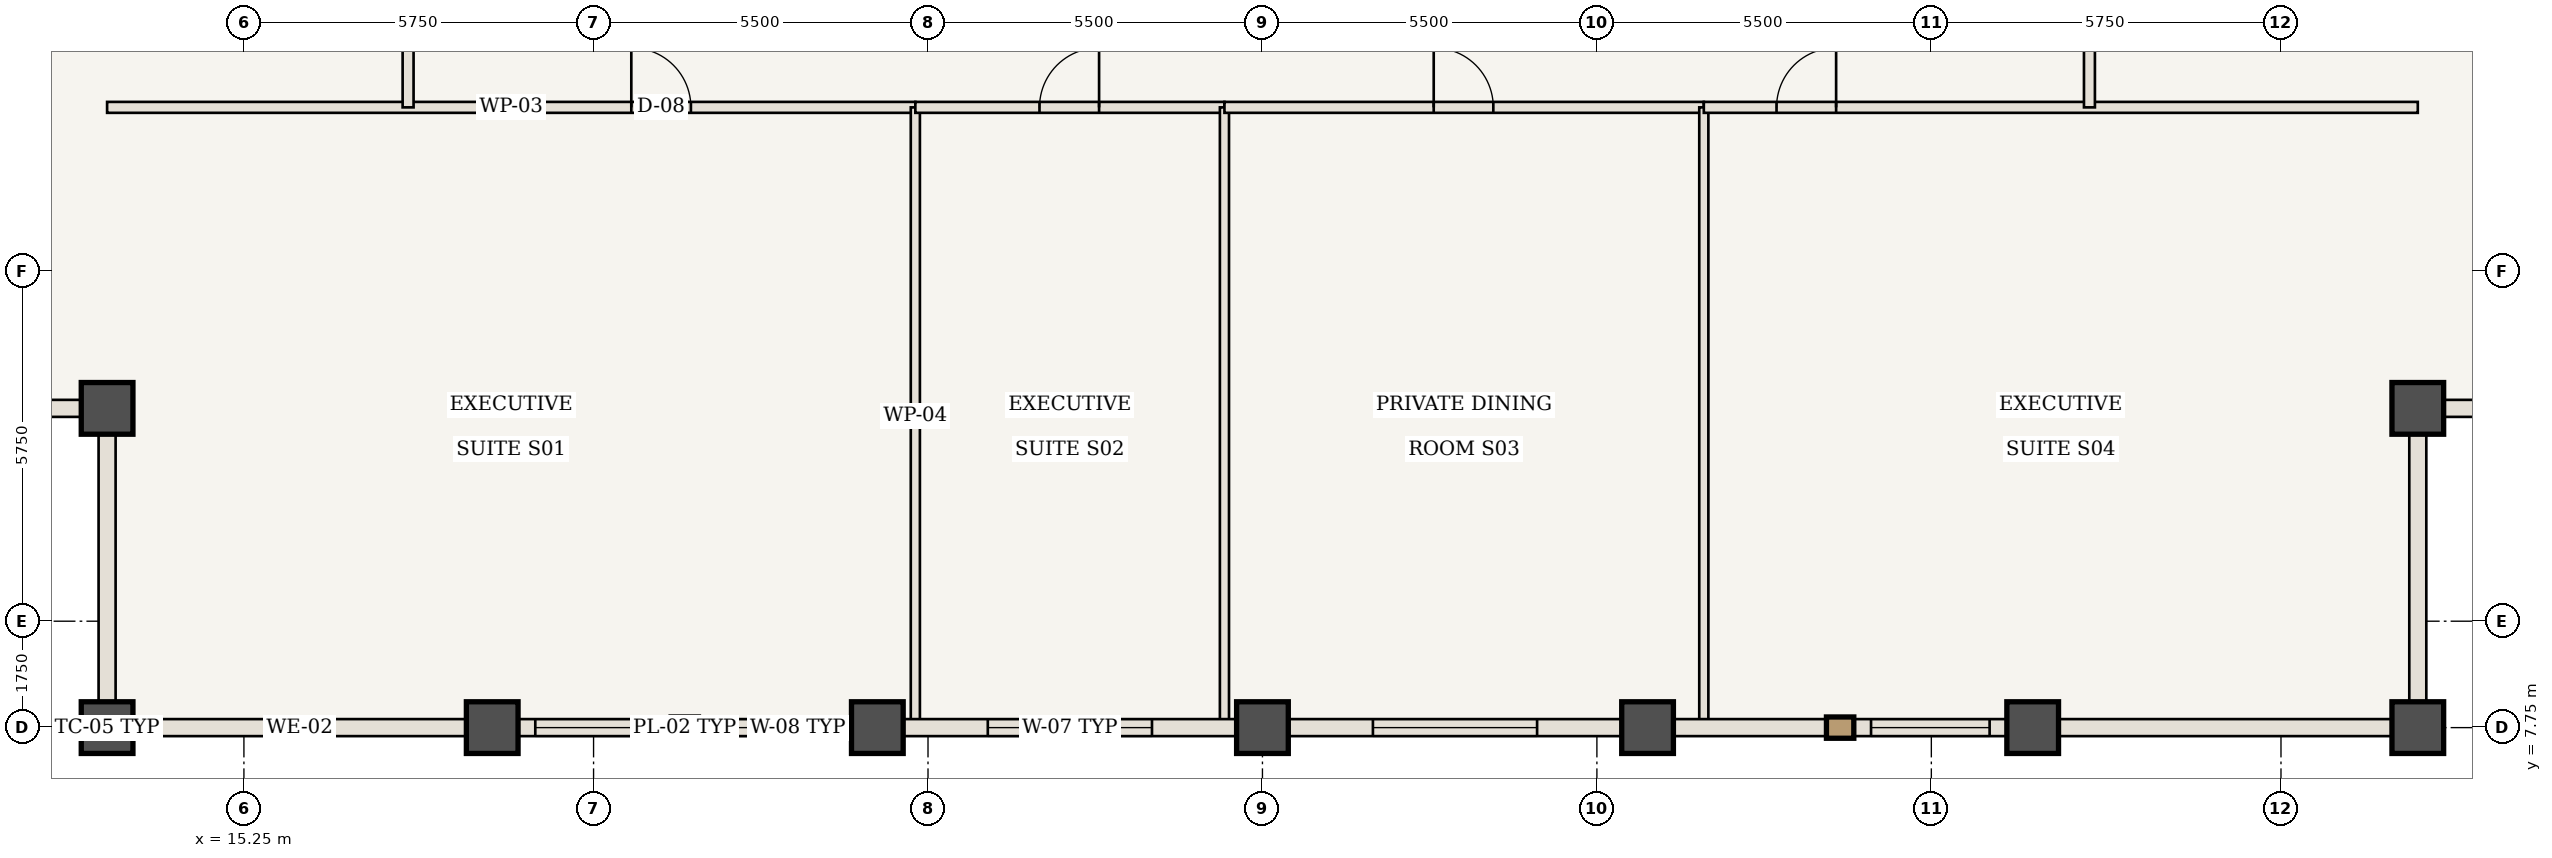
"""IFC4 building model, lengths in metres.
Left out: names, types, materials, properties, quantities, classifications, styles, units other than length and angle.
Written with IfcOpenShell. Run it as: python <this file> out.ifc"""

import sys

from ifc_helpers import new_model, si_unit, direction, frame, frame_2d, origin, origin_2d, place, context, subcontext, project, spatial, rectangle, extrude, element, fill, save


model = new_model("IFC4")
c1 = context("Model", 3, precision=1e-05, world=origin(), true_north=direction((0.0, 1.0)))
c2 = subcontext(c1, "Body", "Model", "MODEL_VIEW")
j1 = project(units=[si_unit("LENGTHUNIT", "METRE"), si_unit("PLANEANGLEUNIT", "RADIAN")], contexts=[c1])
p1 = place(None, origin())
s1 = spatial("IfcSite", under=j1, at=p1, CompositionType="ELEMENT")
p2 = place(p1, origin())
s2 = spatial("IfcBuilding", under=s1, at=p2, CompositionType="ELEMENT")
p3 = place(p2, frame((0.0, 0.0, 229.25)))
s3 = spatial("IfcBuildingStorey", under=s2, at=p3, CompositionType="ELEMENT", Elevation=229.25)
for number, where, z_axis, x_axis in (
    (1, (13.0, 7.75, 0.0), (0.0, 0.0, 1.0), (1.0, 0.0, 0.0)),
    (2, (13.0, 13.0, 0.0), (0.0, 0.0, 1.0), (1.0, 0.0, 0.0)),
    (3, (51.0, 7.75, 0.0), (0.0, 0.0, 1.0), (1.0, 0.0, 0.0)),
    (4, (51.0, 13.0, 0.0), (0.0, 0.0, 1.0), (1.0, 0.0, 0.0)),
    (5, (19.333, 7.75, 0.0), (0.0, 0.0, 1.0), (1.0, 0.0, 0.0)),
    (6, (25.667, 7.75, 0.0), (0.0, 0.0, 1.0), (1.0, 0.0, 0.0)),
    (7, (32.0, 7.75, 0.0), (0.0, 0.0, 1.0), (1.0, 0.0, 0.0)),
    (8, (38.333, 7.75, 0.0), (0.0, 0.0, 1.0), (1.0, 0.0, 0.0)),
    (9, (44.667, 7.75, 0.0), (0.0, 0.0, 1.0), (1.0, 0.0, 0.0)),
):
    element("IfcColumn", number, at=place(p3, frame(where, z_axis=z_axis, x_axis=x_axis)), inside=s3, PredefinedType="COLUMN", context=c2, shape_type="SweptSolid", body=[
        extrude(rectangle(XDim=0.85, YDim=0.85, at=origin_2d()), origin(), (0.0, 0.0, 1.0), 3.85),
    ])
p4 = place(p3, frame((13.0, 17.95, 0.0), z_axis=(0.0, 0.0, 1.0), x_axis=(1.0, 0.0, 0.0)))
e10 = element("IfcWall", 10, at=p4, inside=s3, PredefinedType="STANDARD", context=c2, shape_type="SweptSolid", body=[
    extrude(rectangle(XDim=13.292, YDim=0.18, at=frame_2d((6.646, 0.0))), origin(), (0.0, 0.0, 1.0), 3.685),
])
p5 = place(p4, frame((8.621, 0.0, 0.0)))
e11 = element("IfcOpeningElement", 11, at=p5, cuts=e10, PredefinedType="OPENING", context=c2, shape_type="SweptSolid", body=[
    extrude(rectangle(XDim=0.98, YDim=2.2, at=frame_2d((0.49, 1.1))), frame((0.0, 0.1, 0.0), z_axis=(0.0, -1.0, 0.0), x_axis=(1.0, 0.0, 0.0)), (0.0, 0.0, 1.0), 0.2),
])
p6 = place(p3, frame((26.292, 7.81, 0.0), z_axis=(0.0, 0.0, 1.0), x_axis=(0.0, 1.0, 0.0)))
e12 = element("IfcWall", 12, at=p6, inside=s3, PredefinedType="STANDARD", context=c2, shape_type="SweptSolid", body=[
    extrude(rectangle(XDim=10.14, YDim=0.15, at=frame_2d((5.07, 0.0))), origin(), (0.0, 0.0, 1.0), 3.685),
])
p7 = place(p3, frame((26.292, 17.95, 0.0), z_axis=(0.0, 0.0, 1.0), x_axis=(1.0, 0.0, 0.0)))
e13 = element("IfcWall", 13, at=p7, inside=s3, PredefinedType="STANDARD", context=c2, shape_type="SweptSolid", body=[
    extrude(rectangle(XDim=5.083, YDim=0.18, at=frame_2d((2.542, 0.0))), origin(), (0.0, 0.0, 1.0), 3.685),
])
p8 = place(p7, frame((2.042, 0.0, 0.0)))
e14 = element("IfcOpeningElement", 14, at=p8, cuts=e13, PredefinedType="OPENING", context=c2, shape_type="SweptSolid", body=[
    extrude(rectangle(XDim=0.98, YDim=2.2, at=frame_2d((0.49, 1.1))), frame((0.0, 0.1, 0.0), z_axis=(0.0, -1.0, 0.0), x_axis=(1.0, 0.0, 0.0)), (0.0, 0.0, 1.0), 0.2),
])
p9 = place(p3, frame((31.375, 7.81, 0.0), z_axis=(0.0, 0.0, 1.0), x_axis=(0.0, 1.0, 0.0)))
e15 = element("IfcWall", 15, at=p9, inside=s3, PredefinedType="STANDARD", context=c2, shape_type="SweptSolid", body=[
    extrude(rectangle(XDim=10.14, YDim=0.15, at=frame_2d((5.07, 0.0))), origin(), (0.0, 0.0, 1.0), 3.685),
])
p10 = place(p3, frame((31.375, 17.95, 0.0), z_axis=(0.0, 0.0, 1.0), x_axis=(1.0, 0.0, 0.0)))
e16 = element("IfcWall", 16, at=p10, inside=s3, PredefinedType="STANDARD", context=c2, shape_type="SweptSolid", body=[
    extrude(rectangle(XDim=7.883, YDim=0.18, at=frame_2d((3.942, 0.0))), origin(), (0.0, 0.0, 1.0), 3.685),
])
p11 = place(p10, frame((3.442, 0.0, 0.0)))
e17 = element("IfcOpeningElement", 17, at=p11, cuts=e16, PredefinedType="OPENING", context=c2, shape_type="SweptSolid", body=[
    extrude(rectangle(XDim=0.98, YDim=2.2, at=frame_2d((0.49, 1.1))), frame((0.0, 0.1, 0.0), z_axis=(0.0, -1.0, 0.0), x_axis=(1.0, 0.0, 0.0)), (0.0, 0.0, 1.0), 0.2),
])
p12 = place(p3, frame((39.258, 7.81, 0.0), z_axis=(0.0, 0.0, 1.0), x_axis=(0.0, 1.0, 0.0)))
e18 = element("IfcWall", 18, at=p12, inside=s3, PredefinedType="STANDARD", context=c2, shape_type="SweptSolid", body=[
    extrude(rectangle(XDim=10.14, YDim=0.15, at=frame_2d((5.07, 0.0))), origin(), (0.0, 0.0, 1.0), 3.685),
])
p13 = place(p3, frame((39.258, 17.95, 0.0), z_axis=(0.0, 0.0, 1.0), x_axis=(1.0, 0.0, 0.0)))
e19 = element("IfcWall", 19, at=p13, inside=s3, PredefinedType="STANDARD", context=c2, shape_type="SweptSolid", body=[
    extrude(rectangle(XDim=11.742, YDim=0.18, at=frame_2d((5.871, 0.0))), origin(), (0.0, 0.0, 1.0), 3.685),
])
p14 = place(p13, frame((1.196, 0.0, 0.0)))
e20 = element("IfcOpeningElement", 20, at=p14, cuts=e19, PredefinedType="OPENING", context=c2, shape_type="SweptSolid", body=[
    extrude(rectangle(XDim=0.98, YDim=2.2, at=frame_2d((0.49, 1.1))), frame((0.0, 0.1, 0.0), z_axis=(0.0, -1.0, 0.0), x_axis=(1.0, 0.0, 0.0)), (0.0, 0.0, 1.0), 0.2),
])
p15 = place(p3, frame((17.95, 17.95, 0.0), z_axis=(0.0, 0.0, 1.0), x_axis=(0.0, 1.0, 0.0)))
e21 = element("IfcWall", 21, at=p15, inside=s3, PredefinedType="STANDARD", context=c2, shape_type="SweptSolid", body=[
    extrude(rectangle(XDim=6.642, YDim=0.18, at=frame_2d((3.321, 0.0))), origin(), (0.0, 0.0, 1.0), 3.685),
])
p16 = place(p15, frame((4.271, 0.0, 0.0)))
e22 = element("IfcOpeningElement", 22, at=p16, cuts=e21, PredefinedType="OPENING", context=c2, shape_type="SweptSolid", body=[
    extrude(rectangle(XDim=0.98, YDim=2.2, at=frame_2d((0.49, 1.1))), frame((0.0, 0.1, 0.0), z_axis=(0.0, -1.0, 0.0), x_axis=(1.0, 0.0, 0.0)), (0.0, 0.0, 1.0), 0.2),
])
p17 = place(p3, frame((45.6, 17.95, 0.0), z_axis=(0.0, 0.0, 1.0), x_axis=(0.0, 1.0, 0.0)))
e23 = element("IfcWall", 23, at=p17, inside=s3, PredefinedType="STANDARD", context=c2, shape_type="SweptSolid", body=[
    extrude(rectangle(XDim=13.1, YDim=0.18, at=frame_2d((6.55, 0.0))), origin(), (0.0, 0.0, 1.0), 3.685),
])
p18 = place(p17, frame((6.05, 0.0, 0.0)))
e24 = element("IfcOpeningElement", 24, at=p18, cuts=e23, PredefinedType="OPENING", context=c2, shape_type="SweptSolid", body=[
    extrude(rectangle(XDim=0.98, YDim=2.2, at=frame_2d((0.49, 1.1))), frame((0.0, 0.1, 0.0), z_axis=(0.0, -1.0, 0.0), x_axis=(1.0, 0.0, 0.0)), (0.0, 0.0, 1.0), 0.2),
])
p19 = place(p3, frame((19.333, 7.75, 0.0), z_axis=(0.0, 0.0, 1.0), x_axis=(-1.0, 0.0, 0.0)))
e25 = element("IfcWall", 25, at=p19, inside=s3, PredefinedType="USERDEFINED", context=c2, shape_type="SweptSolid", body=[
    extrude(rectangle(XDim=6.333, YDim=0.28, at=frame_2d((3.167, 0.0))), origin(), (0.0, 0.0, 1.0), 2.985),
])
p20 = place(p3, frame((25.667, 7.75, 0.0), z_axis=(0.0, 0.0, 1.0), x_axis=(-1.0, 0.0, 0.0)))
e26 = element("IfcWall", 26, at=p20, inside=s3, PredefinedType="USERDEFINED", context=c2, shape_type="SweptSolid", body=[
    extrude(rectangle(XDim=6.333, YDim=0.28, at=frame_2d((3.167, 0.0))), origin(), (0.0, 0.0, 1.0), 2.985),
])
p21 = place(p20, frame((0.708, 0.0, 0.85)))
e27 = element("IfcOpeningElement", 27, at=p21, cuts=e26, PredefinedType="OPENING", context=c2, shape_type="SweptSolid", body=[
    extrude(rectangle(XDim=1.95, YDim=1.935, at=frame_2d((0.975, 0.968))), frame((0.0, 0.15, 0.0), z_axis=(0.0, -1.0, 0.0), x_axis=(1.0, 0.0, 0.0)), (0.0, 0.0, 1.0), 0.3),
])
p22 = place(p20, frame((3.675, 0.0, 0.85)))
e28 = element("IfcOpeningElement", 28, at=p22, cuts=e26, PredefinedType="OPENING", context=c2, shape_type="SweptSolid", body=[
    extrude(rectangle(XDim=1.95, YDim=1.935, at=frame_2d((0.975, 0.968))), frame((0.0, 0.15, 0.0), z_axis=(0.0, -1.0, 0.0), x_axis=(1.0, 0.0, 0.0)), (0.0, 0.0, 1.0), 0.3),
])
p23 = place(p3, frame((32.0, 7.75, 0.0), z_axis=(0.0, 0.0, 1.0), x_axis=(-1.0, 0.0, 0.0)))
e29 = element("IfcWall", 29, at=p23, inside=s3, PredefinedType="USERDEFINED", context=c2, shape_type="SweptSolid", body=[
    extrude(rectangle(XDim=6.333, YDim=0.28, at=frame_2d((3.167, 0.0))), origin(), (0.0, 0.0, 1.0), 2.985),
])
p24 = place(p23, frame((1.817, 0.0, 0.85)))
e30 = element("IfcOpeningElement", 30, at=p24, cuts=e29, PredefinedType="OPENING", context=c2, shape_type="SweptSolid", body=[
    extrude(rectangle(XDim=2.7, YDim=1.935, at=frame_2d((1.35, 0.968))), frame((0.0, 0.15, 0.0), z_axis=(0.0, -1.0, 0.0), x_axis=(1.0, 0.0, 0.0)), (0.0, 0.0, 1.0), 0.3),
])
p25 = place(p3, frame((38.333, 7.75, 0.0), z_axis=(0.0, 0.0, 1.0), x_axis=(-1.0, 0.0, 0.0)))
e31 = element("IfcWall", 31, at=p25, inside=s3, PredefinedType="USERDEFINED", context=c2, shape_type="SweptSolid", body=[
    extrude(rectangle(XDim=6.333, YDim=0.28, at=frame_2d((3.167, 0.0))), origin(), (0.0, 0.0, 1.0), 2.985),
])
p26 = place(p25, frame((1.817, 0.0, 0.85)))
e32 = element("IfcOpeningElement", 32, at=p26, cuts=e31, PredefinedType="OPENING", context=c2, shape_type="SweptSolid", body=[
    extrude(rectangle(XDim=2.7, YDim=1.935, at=frame_2d((1.35, 0.968))), frame((0.0, 0.15, 0.0), z_axis=(0.0, -1.0, 0.0), x_axis=(1.0, 0.0, 0.0)), (0.0, 0.0, 1.0), 0.3),
])
p27 = place(p3, frame((44.667, 7.75, 0.0), z_axis=(0.0, 0.0, 1.0), x_axis=(-1.0, 0.0, 0.0)))
e33 = element("IfcWall", 33, at=p27, inside=s3, PredefinedType="USERDEFINED", context=c2, shape_type="SweptSolid", body=[
    extrude(rectangle(XDim=6.333, YDim=0.28, at=frame_2d((3.167, 0.0))), origin(), (0.0, 0.0, 1.0), 2.985),
])
p28 = place(p27, frame((0.708, 0.0, 0.85)))
e34 = element("IfcOpeningElement", 34, at=p28, cuts=e33, PredefinedType="OPENING", context=c2, shape_type="SweptSolid", body=[
    extrude(rectangle(XDim=1.95, YDim=1.935, at=frame_2d((0.975, 0.968))), frame((0.0, 0.15, 0.0), z_axis=(0.0, -1.0, 0.0), x_axis=(1.0, 0.0, 0.0)), (0.0, 0.0, 1.0), 0.3),
])
p29 = place(p3, frame((51.0, 7.75, 0.0), z_axis=(0.0, 0.0, 1.0), x_axis=(-1.0, 0.0, 0.0)))
e35 = element("IfcWall", 35, at=p29, inside=s3, PredefinedType="USERDEFINED", context=c2, shape_type="SweptSolid", body=[
    extrude(rectangle(XDim=6.333, YDim=0.28, at=frame_2d((3.167, 0.0))), origin(), (0.0, 0.0, 1.0), 2.985),
])
for number, where, z_axis, x_axis in (
    (36, (13.0, 7.75, 0.0), (0.0, 0.0, 1.0), (0.0, 1.0, 0.0)),
    (37, (13.0, 13.0, 0.0), (0.0, 0.0, 1.0), (-1.0, 0.0, 0.0)),
    (38, (51.0, 13.0, 0.0), (0.0, 0.0, 1.0), (0.0, -1.0, 0.0)),
    (39, (56.25, 13.0, 0.0), (0.0, 0.0, 1.0), (-1.0, 0.0, 0.0)),
):
    element("IfcWall", number, at=place(p3, frame(where, z_axis=z_axis, x_axis=x_axis)), inside=s3, PredefinedType="USERDEFINED", context=c2, shape_type="SweptSolid", body=[
        extrude(rectangle(XDim=5.25, YDim=0.28, at=frame_2d((2.625, 0.0))), origin(), (0.0, 0.0, 1.0), 2.985),
    ])
p30 = place(p5, origin())
e40 = element("IfcDoor", 40, at=p30, inside=s3, OperationType="SINGLE_SWING_LEFT", PredefinedType="DOOR", context=c2, shape_type="SweptSolid", body=[
    extrude(rectangle(XDim=0.98, YDim=2.2, at=frame_2d((0.49, 1.1))), frame((0.0, 0.025, 0.0), z_axis=(0.0, -1.0, 0.0), x_axis=(1.0, 0.0, 0.0)), (0.0, 0.0, 1.0), 0.05),
])
fill(e11, e40)
p31 = place(p8, origin())
e41 = element("IfcDoor", 41, at=p31, inside=s3, OperationType="SINGLE_SWING_RIGHT", PredefinedType="DOOR", context=c2, shape_type="SweptSolid", body=[
    extrude(rectangle(XDim=0.98, YDim=2.2, at=frame_2d((0.49, 1.1))), frame((0.0, 0.025, 0.0), z_axis=(0.0, -1.0, 0.0), x_axis=(1.0, 0.0, 0.0)), (0.0, 0.0, 1.0), 0.05),
])
fill(e14, e41)
p32 = place(p11, origin())
e42 = element("IfcDoor", 42, at=p32, inside=s3, OperationType="SINGLE_SWING_LEFT", PredefinedType="DOOR", context=c2, shape_type="SweptSolid", body=[
    extrude(rectangle(XDim=0.98, YDim=2.2, at=frame_2d((0.49, 1.1))), frame((0.0, 0.025, 0.0), z_axis=(0.0, -1.0, 0.0), x_axis=(1.0, 0.0, 0.0)), (0.0, 0.0, 1.0), 0.05),
])
fill(e17, e42)
p33 = place(p14, origin())
e43 = element("IfcDoor", 43, at=p33, inside=s3, OperationType="SINGLE_SWING_RIGHT", PredefinedType="DOOR", context=c2, shape_type="SweptSolid", body=[
    extrude(rectangle(XDim=0.98, YDim=2.2, at=frame_2d((0.49, 1.1))), frame((0.0, 0.025, 0.0), z_axis=(0.0, -1.0, 0.0), x_axis=(1.0, 0.0, 0.0)), (0.0, 0.0, 1.0), 0.05),
])
fill(e20, e43)
p34 = place(p21, origin())
e44 = element("IfcWindow", 44, at=p34, inside=s3, PartitioningType="SINGLE_PANEL", PredefinedType="WINDOW", context=c2, shape_type="SweptSolid", body=[
    extrude(rectangle(XDim=1.95, YDim=1.935, at=frame_2d((0.975, 0.968))), frame((0.0, 0.03, 0.0), z_axis=(0.0, -1.0, 0.0), x_axis=(1.0, 0.0, 0.0)), (0.0, 0.0, 1.0), 0.06),
])
fill(e27, e44)
p35 = place(p22, origin())
e45 = element("IfcWindow", 45, at=p35, inside=s3, PartitioningType="SINGLE_PANEL", PredefinedType="WINDOW", context=c2, shape_type="SweptSolid", body=[
    extrude(rectangle(XDim=1.95, YDim=1.935, at=frame_2d((0.975, 0.968))), frame((0.0, 0.03, 0.0), z_axis=(0.0, -1.0, 0.0), x_axis=(1.0, 0.0, 0.0)), (0.0, 0.0, 1.0), 0.06),
])
fill(e28, e45)
p36 = place(p24, origin())
e46 = element("IfcWindow", 46, at=p36, inside=s3, PartitioningType="SINGLE_PANEL", PredefinedType="WINDOW", context=c2, shape_type="SweptSolid", body=[
    extrude(rectangle(XDim=2.7, YDim=1.935, at=frame_2d((1.35, 0.968))), frame((0.0, 0.03, 0.0), z_axis=(0.0, -1.0, 0.0), x_axis=(1.0, 0.0, 0.0)), (0.0, 0.0, 1.0), 0.06),
])
fill(e30, e46)
p37 = place(p26, origin())
e47 = element("IfcWindow", 47, at=p37, inside=s3, PartitioningType="SINGLE_PANEL", PredefinedType="WINDOW", context=c2, shape_type="SweptSolid", body=[
    extrude(rectangle(XDim=2.7, YDim=1.935, at=frame_2d((1.35, 0.968))), frame((0.0, 0.03, 0.0), z_axis=(0.0, -1.0, 0.0), x_axis=(1.0, 0.0, 0.0)), (0.0, 0.0, 1.0), 0.06),
])
fill(e32, e47)
p38 = place(p28, origin())
e48 = element("IfcWindow", 48, at=p38, inside=s3, PartitioningType="SINGLE_PANEL", PredefinedType="WINDOW", context=c2, shape_type="SweptSolid", body=[
    extrude(rectangle(XDim=1.95, YDim=1.935, at=frame_2d((0.975, 0.968))), frame((0.0, 0.03, 0.0), z_axis=(0.0, -1.0, 0.0), x_axis=(1.0, 0.0, 0.0)), (0.0, 0.0, 1.0), 0.06),
])
fill(e34, e48)
save(model, sys.argv[1])
